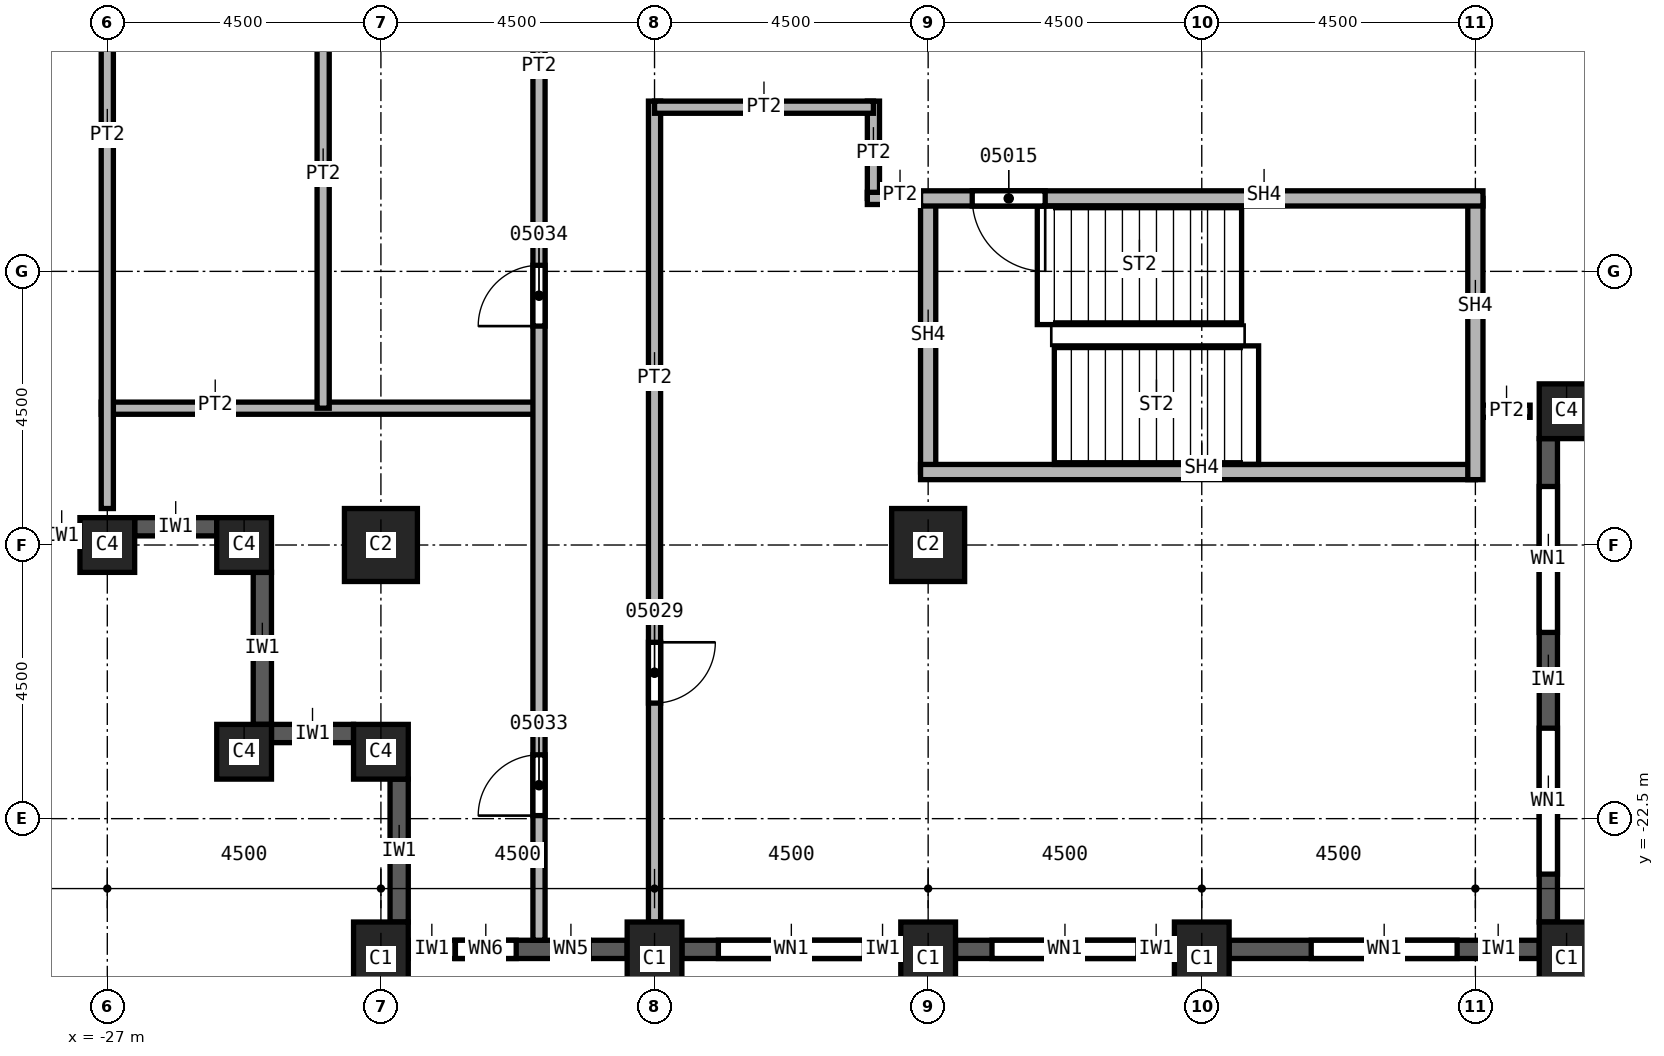
"""IFC4 building model, lengths in metres.
Left out: names, types, materials, properties, quantities, classifications, styles, units other than length and angle.
Written with IfcOpenShell. Run it as: python <this file> out.ifc"""

import sys

from ifc_helpers import new_model, si_unit, direction, frame, frame_2d, origin, origin_2d, place, context, subcontext, project, spatial, rectangle, extrude, element, fill, save


model = new_model("IFC4")
c1 = context("Model", 3, precision=1e-05, world=origin(), true_north=direction((0.0, 1.0)))
c2 = subcontext(c1, "Body", "Model", "MODEL_VIEW")
j1 = project(units=[si_unit("LENGTHUNIT", "METRE"), si_unit("PLANEANGLEUNIT", "RADIAN")], contexts=[c1])
p1 = place(None, origin())
s1 = spatial("IfcSite", under=j1, at=p1, CompositionType="ELEMENT")
p2 = place(p1, origin())
s2 = spatial("IfcBuilding", under=s1, at=p2, CompositionType="ELEMENT")
p3 = place(p2, frame((0.0, 0.0, 112.0)))
s3 = spatial("IfcBuildingStorey", under=s2, at=p3, CompositionType="ELEMENT", Elevation=112.0)
for number, where, z_axis, x_axis in (
    (1, (-13.5, -18.0, 0.0), (0.0, 0.0, 1.0), (1.0, 0.0, 0.0)),
    (2, (-22.5, -18.0, 0.0), (0.0, 0.0, 1.0), (1.0, 0.0, 0.0)),
):
    element("IfcColumn", number, at=place(p3, frame(where, z_axis=z_axis, x_axis=x_axis)), inside=s3, PredefinedType="COLUMN", context=c2, shape_type="SweptSolid", body=[
        extrude(rectangle(XDim=1.2, YDim=1.2, at=origin_2d()), origin(), (0.0, 0.0, 1.0), 3.7),
    ])
for number, where, z_axis, x_axis in (
    (3, (-3.0, -24.8, 0.0), (0.0, 0.0, 1.0), (1.0, 0.0, 0.0)),
    (4, (-9.0, -24.8, 0.0), (0.0, 0.0, 1.0), (1.0, 0.0, 0.0)),
    (5, (-13.5, -24.8, 0.0), (0.0, 0.0, 1.0), (1.0, 0.0, 0.0)),
    (6, (-18.0, -24.8, 0.0), (0.0, 0.0, 1.0), (1.0, 0.0, 0.0)),
    (7, (-22.5, -24.8, 0.0), (0.0, 0.0, 1.0), (1.0, 0.0, 0.0)),
):
    element("IfcColumn", number, at=place(p3, frame(where, z_axis=z_axis, x_axis=x_axis)), inside=s3, PredefinedType="COLUMN", context=c2, shape_type="SweptSolid", body=[
        extrude(rectangle(XDim=0.9, YDim=1.2, at=origin_2d()), origin(), (0.0, 0.0, 1.0), 3.7),
    ])
for number, where, z_axis, x_axis in (
    (8, (-27.0, -18.0, 0.0), (0.0, 0.0, 1.0), (1.0, 0.0, 0.0)),
    (9, (-3.0, -15.8, 0.0), (0.0, 0.0, 1.0), (1.0, 0.0, 0.0)),
    (10, (-22.5, -21.4, 0.0), (0.0, 0.0, 1.0), (1.0, 0.0, 0.0)),
    (11, (-24.75, -21.4, 0.0), (0.0, 0.0, 1.0), (1.0, 0.0, 0.0)),
    (12, (-24.75, -18.0, 0.0), (0.0, 0.0, 1.0), (1.0, 0.0, 0.0)),
):
    element("IfcColumn", number, at=place(p3, frame(where, z_axis=z_axis, x_axis=x_axis)), inside=s3, PredefinedType="COLUMN", context=c2, shape_type="SweptSolid", body=[
        extrude(rectangle(XDim=0.9, YDim=0.9, at=origin_2d()), origin(), (0.0, 0.0, 1.0), 3.7),
    ])
p4 = place(p3, frame((-31.05, -17.85, 0.0), z_axis=(0.0, 0.0, 1.0), x_axis=(1.0, 0.0, 0.0)))
e13 = element("IfcWall", 13, at=p4, inside=s3, PredefinedType="SOLIDWALL", context=c2, shape_type="SweptSolid", body=[
    extrude(rectangle(XDim=3.6, YDim=0.3, at=frame_2d((1.8, 0.0))), origin(), (0.0, 0.0, 1.0), 3.1),
])
p5 = place(p4, frame((0.6, 0.0, 0.8)))
e14 = element("IfcOpeningElement", 14, at=p5, cuts=e13, PredefinedType="OPENING", context=c2, shape_type="SweptSolid", body=[
    extrude(rectangle(XDim=2.4, YDim=1.95, at=frame_2d((1.2, 0.975))), frame((0.0, 0.15, 0.0), z_axis=(0.0, -1.0, 0.0), x_axis=(1.0, 0.0, 0.0)), (0.0, 0.0, 1.0), 0.3),
])
p6 = place(p3, frame((-26.55, -17.7, 0.0), z_axis=(0.0, 0.0, 1.0), x_axis=(1.0, 0.0, 0.0)))
e15 = element("IfcWall", 15, at=p6, inside=s3, PredefinedType="SOLIDWALL", context=c2, shape_type="SweptSolid", body=[
    extrude(rectangle(XDim=1.35, YDim=0.3, at=frame_2d((0.675, 0.0))), origin(), (0.0, 0.0, 1.0), 3.1),
])
p7 = place(p3, frame((-24.45, -18.45, 0.0), z_axis=(0.0, 0.0, 1.0), x_axis=(0.0, -1.0, 0.0)))
e16 = element("IfcWall", 16, at=p7, inside=s3, PredefinedType="SOLIDWALL", context=c2, shape_type="SweptSolid", body=[
    extrude(rectangle(XDim=2.5, YDim=0.3, at=frame_2d((1.25, 0.0))), origin(), (0.0, 0.0, 1.0), 3.1),
])
p8 = place(p3, frame((-24.3, -21.1, 0.0), z_axis=(0.0, 0.0, 1.0), x_axis=(1.0, 0.0, 0.0)))
e17 = element("IfcWall", 17, at=p8, inside=s3, PredefinedType="SOLIDWALL", context=c2, shape_type="SweptSolid", body=[
    extrude(rectangle(XDim=1.35, YDim=0.3, at=frame_2d((0.675, 0.0))), origin(), (0.0, 0.0, 1.0), 3.1),
])
p9 = place(p3, frame((-22.2, -21.85, 0.0), z_axis=(0.0, 0.0, 1.0), x_axis=(0.0, -1.0, 0.0)))
e18 = element("IfcWall", 18, at=p9, inside=s3, PredefinedType="SOLIDWALL", context=c2, shape_type="SweptSolid", body=[
    extrude(rectangle(XDim=2.35, YDim=0.3, at=frame_2d((1.175, 0.0))), origin(), (0.0, 0.0, 1.0), 3.1),
])
p10 = place(p3, frame((-22.05, -24.65, 0.0), z_axis=(0.0, 0.0, 1.0), x_axis=(1.0, 0.0, 0.0)))
e19 = element("IfcWall", 19, at=p10, inside=s3, PredefinedType="SOLIDWALL", context=c2, shape_type="SweptSolid", body=[
    extrude(rectangle(XDim=3.6, YDim=0.3, at=frame_2d((1.8, 0.0))), origin(), (0.0, 0.0, 1.0), 3.1),
])
p11 = place(p10, frame((0.775, 0.0, 0.8)))
e20 = element("IfcOpeningElement", 20, at=p11, cuts=e19, PredefinedType="OPENING", context=c2, shape_type="SweptSolid", body=[
    extrude(rectangle(XDim=1.0, YDim=1.95, at=frame_2d((0.5, 0.975))), frame((0.0, 0.15, 0.0), z_axis=(0.0, -1.0, 0.0), x_axis=(1.0, 0.0, 0.0)), (0.0, 0.0, 1.0), 0.3),
])
p12 = place(p10, frame((2.375, 0.0, 0.8)))
e21 = element("IfcOpeningElement", 21, at=p12, cuts=e19, PredefinedType="OPENING", context=c2, shape_type="SweptSolid", body=[
    extrude(rectangle(XDim=0.6, YDim=1.95, at=frame_2d((0.3, 0.975))), frame((0.0, 0.15, 0.0), z_axis=(0.0, -1.0, 0.0), x_axis=(1.0, 0.0, 0.0)), (0.0, 0.0, 1.0), 0.3),
])
p13 = place(p3, frame((-17.55, -24.65, 0.0), z_axis=(0.0, 0.0, 1.0), x_axis=(1.0, 0.0, 0.0)))
e22 = element("IfcWall", 22, at=p13, inside=s3, PredefinedType="SOLIDWALL", context=c2, shape_type="SweptSolid", body=[
    extrude(rectangle(XDim=3.6, YDim=0.3, at=frame_2d((1.8, 0.0))), origin(), (0.0, 0.0, 1.0), 3.1),
])
p14 = place(p13, frame((0.6, 0.0, 0.8)))
e23 = element("IfcOpeningElement", 23, at=p14, cuts=e22, PredefinedType="OPENING", context=c2, shape_type="SweptSolid", body=[
    extrude(rectangle(XDim=2.4, YDim=1.95, at=frame_2d((1.2, 0.975))), frame((0.0, 0.15, 0.0), z_axis=(0.0, -1.0, 0.0), x_axis=(1.0, 0.0, 0.0)), (0.0, 0.0, 1.0), 0.3),
])
p15 = place(p3, frame((-13.05, -24.65, 0.0), z_axis=(0.0, 0.0, 1.0), x_axis=(1.0, 0.0, 0.0)))
e24 = element("IfcWall", 24, at=p15, inside=s3, PredefinedType="SOLIDWALL", context=c2, shape_type="SweptSolid", body=[
    extrude(rectangle(XDim=3.6, YDim=0.3, at=frame_2d((1.8, 0.0))), origin(), (0.0, 0.0, 1.0), 3.1),
])
p16 = place(p15, frame((0.6, 0.0, 0.8)))
e25 = element("IfcOpeningElement", 25, at=p16, cuts=e24, PredefinedType="OPENING", context=c2, shape_type="SweptSolid", body=[
    extrude(rectangle(XDim=2.4, YDim=1.95, at=frame_2d((1.2, 0.975))), frame((0.0, 0.15, 0.0), z_axis=(0.0, -1.0, 0.0), x_axis=(1.0, 0.0, 0.0)), (0.0, 0.0, 1.0), 0.3),
])
p17 = place(p3, frame((-8.55, -24.65, 0.0), z_axis=(0.0, 0.0, 1.0), x_axis=(1.0, 0.0, 0.0)))
e26 = element("IfcWall", 26, at=p17, inside=s3, PredefinedType="SOLIDWALL", context=c2, shape_type="SweptSolid", body=[
    extrude(rectangle(XDim=5.1, YDim=0.3, at=frame_2d((2.55, 0.0))), origin(), (0.0, 0.0, 1.0), 3.1),
])
p18 = place(p17, frame((1.35, 0.0, 0.8)))
e27 = element("IfcOpeningElement", 27, at=p18, cuts=e26, PredefinedType="OPENING", context=c2, shape_type="SweptSolid", body=[
    extrude(rectangle(XDim=2.4, YDim=1.95, at=frame_2d((1.2, 0.975))), frame((0.0, 0.15, 0.0), z_axis=(0.0, -1.0, 0.0), x_axis=(1.0, 0.0, 0.0)), (0.0, 0.0, 1.0), 0.3),
])
p19 = place(p3, frame((-3.3, -24.2, 0.0), z_axis=(0.0, 0.0, 1.0), x_axis=(0.0, 1.0, 0.0)))
e28 = element("IfcWall", 28, at=p19, inside=s3, PredefinedType="SOLIDWALL", context=c2, shape_type="SweptSolid", body=[
    extrude(rectangle(XDim=7.95, YDim=0.3, at=frame_2d((3.975, 0.0))), origin(), (0.0, 0.0, 1.0), 3.1),
])
p20 = place(p19, frame((0.788, 0.0, 0.8)))
e29 = element("IfcOpeningElement", 29, at=p20, cuts=e28, PredefinedType="OPENING", context=c2, shape_type="SweptSolid", body=[
    extrude(rectangle(XDim=2.4, YDim=1.95, at=frame_2d((1.2, 0.975))), frame((0.0, 0.15, 0.0), z_axis=(0.0, -1.0, 0.0), x_axis=(1.0, 0.0, 0.0)), (0.0, 0.0, 1.0), 0.3),
])
p21 = place(p19, frame((4.762, 0.0, 0.8)))
e30 = element("IfcOpeningElement", 30, at=p21, cuts=e28, PredefinedType="OPENING", context=c2, shape_type="SweptSolid", body=[
    extrude(rectangle(XDim=2.4, YDim=1.95, at=frame_2d((1.2, 0.975))), frame((0.0, 0.15, 0.0), z_axis=(0.0, -1.0, 0.0), x_axis=(1.0, 0.0, 0.0)), (0.0, 0.0, 1.0), 0.3),
])
p22 = place(p3, frame((-27.1, -15.75, 0.0), z_axis=(0.0, 0.0, 1.0), x_axis=(1.0, 0.0, 0.0)))
e31 = element("IfcWall", 31, at=p22, inside=s3, PredefinedType="PARTITIONING", context=c2, shape_type="SweptSolid", body=[
    extrude(rectangle(XDim=7.2, YDim=0.2, at=frame_2d((3.6, 0.0))), origin(), (0.0, 0.0, 1.0), 3.7),
])
p23 = place(p3, frame((-27.0, -17.4, 0.0), z_axis=(0.0, 0.0, 1.0), x_axis=(0.0, 1.0, 0.0)))
e32 = element("IfcWall", 32, at=p23, inside=s3, PredefinedType="PARTITIONING", context=c2, shape_type="SweptSolid", body=[
    extrude(rectangle(XDim=18.15, YDim=0.2, at=frame_2d((9.075, 0.0))), origin(), (0.0, 0.0, 1.0), 3.7),
])
p24 = place(p3, frame((-23.45, -15.75, 0.0), z_axis=(0.0, 0.0, 1.0), x_axis=(0.0, 1.0, 0.0)))
e33 = element("IfcWall", 33, at=p24, inside=s3, PredefinedType="PARTITIONING", context=c2, shape_type="SweptSolid", body=[
    extrude(rectangle(XDim=16.5, YDim=0.2, at=frame_2d((8.25, 0.0))), origin(), (0.0, 0.0, 1.0), 3.7),
])
p25 = place(p24, frame((7.6, 0.0, 0.0)))
e34 = element("IfcOpeningElement", 34, at=p25, cuts=e33, PredefinedType="OPENING", context=c2, shape_type="SweptSolid", body=[
    extrude(rectangle(XDim=1.0, YDim=2.1, at=frame_2d((0.5, 1.05))), frame((0.0, 0.1, 0.0), z_axis=(0.0, -1.0, 0.0), x_axis=(1.0, 0.0, 0.0)), (0.0, 0.0, 1.0), 0.2),
])
p26 = place(p24, frame((13.15, 0.0, 0.0)))
e35 = element("IfcOpeningElement", 35, at=p26, cuts=e33, PredefinedType="OPENING", context=c2, shape_type="SweptSolid", body=[
    extrude(rectangle(XDim=1.0, YDim=2.1, at=frame_2d((0.5, 1.05))), frame((0.0, 0.1, 0.0), z_axis=(0.0, -1.0, 0.0), x_axis=(1.0, 0.0, 0.0)), (0.0, 0.0, 1.0), 0.2),
])
p27 = place(p3, frame((-19.9, -24.5, 0.0), z_axis=(0.0, 0.0, 1.0), x_axis=(0.0, 1.0, 0.0)))
e36 = element("IfcWall", 36, at=p27, inside=s3, PredefinedType="PARTITIONING", context=c2, shape_type="SweptSolid", body=[
    extrude(rectangle(XDim=25.35, YDim=0.2, at=frame_2d((12.675, 0.0))), origin(), (0.0, 0.0, 1.0), 3.7),
])
p28 = place(p27, frame((2.05, 0.0, 0.0)))
e37 = element("IfcOpeningElement", 37, at=p28, cuts=e36, PredefinedType="OPENING", context=c2, shape_type="SweptSolid", body=[
    extrude(rectangle(XDim=1.0, YDim=2.1, at=frame_2d((0.5, 1.05))), frame((0.0, 0.1, 0.0), z_axis=(0.0, -1.0, 0.0), x_axis=(1.0, 0.0, 0.0)), (0.0, 0.0, 1.0), 0.2),
])
p29 = place(p27, frame((10.1, 0.0, 0.0)))
e38 = element("IfcOpeningElement", 38, at=p29, cuts=e36, PredefinedType="OPENING", context=c2, shape_type="SweptSolid", body=[
    extrude(rectangle(XDim=1.0, YDim=2.1, at=frame_2d((0.5, 1.05))), frame((0.0, 0.1, 0.0), z_axis=(0.0, -1.0, 0.0), x_axis=(1.0, 0.0, 0.0)), (0.0, 0.0, 1.0), 0.2),
])
p30 = place(p27, frame((22.85, 0.0, 0.0)))
e39 = element("IfcOpeningElement", 39, at=p30, cuts=e36, PredefinedType="OPENING", context=c2, shape_type="SweptSolid", body=[
    extrude(rectangle(XDim=1.0, YDim=2.1, at=frame_2d((0.5, 1.05))), frame((0.0, 0.1, 0.0), z_axis=(0.0, -1.0, 0.0), x_axis=(1.0, 0.0, 0.0)), (0.0, 0.0, 1.0), 0.2),
])
p31 = place(p3, frame((-18.0, -10.7, 0.0), z_axis=(0.0, 0.0, 1.0), x_axis=(0.0, -1.0, 0.0)))
e40 = element("IfcWall", 40, at=p31, inside=s3, PredefinedType="PARTITIONING", context=c2, shape_type="SweptSolid", body=[
    extrude(rectangle(XDim=13.5, YDim=0.2, at=frame_2d((6.75, 0.0))), origin(), (0.0, 0.0, 1.0), 3.7),
])
p32 = place(p31, frame((8.9, 0.0, 0.0)))
e41 = element("IfcOpeningElement", 41, at=p32, cuts=e40, PredefinedType="OPENING", context=c2, shape_type="SweptSolid", body=[
    extrude(rectangle(XDim=1.0, YDim=2.1, at=frame_2d((0.5, 1.05))), frame((0.0, 0.1, 0.0), z_axis=(0.0, -1.0, 0.0), x_axis=(1.0, 0.0, 0.0)), (0.0, 0.0, 1.0), 0.2),
])
p33 = place(p3, frame((-14.4, -12.3, 0.0), z_axis=(0.0, 0.0, 1.0), x_axis=(0.0, 1.0, 0.0)))
e42 = element("IfcWall", 42, at=p33, inside=s3, PredefinedType="PARTITIONING", context=c2, shape_type="SweptSolid", body=[
    extrude(rectangle(XDim=1.6, YDim=0.2, at=frame_2d((0.8, 0.0))), origin(), (0.0, 0.0, 1.0), 3.7),
])
p34 = place(p3, frame((-14.4, -10.8, 0.0), z_axis=(0.0, 0.0, 1.0), x_axis=(-1.0, 0.0, 0.0)))
e43 = element("IfcWall", 43, at=p34, inside=s3, PredefinedType="PARTITIONING", context=c2, shape_type="SweptSolid", body=[
    extrude(rectangle(XDim=3.6, YDim=0.2, at=frame_2d((1.8, 0.0))), origin(), (0.0, 0.0, 1.0), 3.7),
])
p35 = place(p3, frame((-13.375, -12.3, 0.0), z_axis=(0.0, 0.0, 1.0), x_axis=(-1.0, 0.0, 0.0)))
e44 = element("IfcWall", 44, at=p35, inside=s3, PredefinedType="PARTITIONING", context=c2, shape_type="SweptSolid", body=[
    extrude(rectangle(XDim=1.125, YDim=0.2, at=frame_2d((0.562, 0.0))), origin(), (0.0, 0.0, 1.0), 3.7),
])
p36 = place(p3, frame((-3.6, -15.8, 0.0), z_axis=(0.0, 0.0, 1.0), x_axis=(-1.0, 0.0, 0.0)))
e45 = element("IfcWall", 45, at=p36, inside=s3, PredefinedType="PARTITIONING", context=c2, shape_type="SweptSolid", body=[
    extrude(rectangle(XDim=0.9, YDim=0.2, at=frame_2d((0.45, 0.0))), origin(), (0.0, 0.0, 1.0), 3.7),
])
p37 = place(p3, frame((-13.5, -16.8, 0.0), z_axis=(0.0, 0.0, 1.0), x_axis=(0.0, 1.0, 0.0)))
e46 = element("IfcWall", 46, at=p37, inside=s3, PredefinedType="SOLIDWALL", context=c2, shape_type="SweptSolid", body=[
    extrude(rectangle(XDim=4.5, YDim=0.25, at=frame_2d((2.25, 0.0))), origin(), (0.0, 0.0, 1.0), 3.7),
])
p38 = place(p3, frame((-4.5, -16.8, 0.0), z_axis=(0.0, 0.0, 1.0), x_axis=(-1.0, 0.0, 0.0)))
e47 = element("IfcWall", 47, at=p38, inside=s3, PredefinedType="SOLIDWALL", context=c2, shape_type="SweptSolid", body=[
    extrude(rectangle(XDim=9.125, YDim=0.25, at=frame_2d((4.562, 0.0))), origin(), (0.0, 0.0, 1.0), 3.7),
])
p39 = place(p3, frame((-4.5, -12.3, 0.0), z_axis=(0.0, 0.0, 1.0), x_axis=(0.0, -1.0, 0.0)))
e48 = element("IfcWall", 48, at=p39, inside=s3, PredefinedType="SOLIDWALL", context=c2, shape_type="SweptSolid", body=[
    extrude(rectangle(XDim=4.625, YDim=0.25, at=frame_2d((2.312, 0.0))), origin(), (0.0, 0.0, 1.0), 3.7),
])
p40 = place(p3, frame((-4.375, -12.3, 0.0), z_axis=(0.0, 0.0, 1.0), x_axis=(-1.0, 0.0, 0.0)))
e49 = element("IfcWall", 49, at=p40, inside=s3, PredefinedType="SOLIDWALL", context=c2, shape_type="SweptSolid", body=[
    extrude(rectangle(XDim=9.25, YDim=0.25, at=frame_2d((4.625, 0.0))), origin(), (0.0, 0.0, 1.0), 3.7),
])
p41 = place(p40, frame((7.2, 0.0, 0.0)))
e50 = element("IfcOpeningElement", 50, at=p41, cuts=e49, PredefinedType="OPENING", context=c2, shape_type="SweptSolid", body=[
    extrude(rectangle(XDim=1.2, YDim=2.1, at=frame_2d((0.6, 1.05))), frame((0.0, 0.125, 0.0), z_axis=(0.0, -1.0, 0.0), x_axis=(1.0, 0.0, 0.0)), (0.0, 0.0, 1.0), 0.25),
])
p42 = place(p14, origin())
e51 = element("IfcWindow", 51, at=p42, inside=s3, PartitioningType="SINGLE_PANEL", PredefinedType="WINDOW", context=c2, shape_type="SweptSolid", body=[
    extrude(rectangle(XDim=2.4, YDim=1.95, at=frame_2d((1.2, 0.975))), frame((0.0, 0.03, 0.0), z_axis=(0.0, -1.0, 0.0), x_axis=(1.0, 0.0, 0.0)), (0.0, 0.0, 1.0), 0.06),
])
fill(e23, e51)
p43 = place(p16, origin())
e52 = element("IfcWindow", 52, at=p43, inside=s3, PartitioningType="SINGLE_PANEL", PredefinedType="WINDOW", context=c2, shape_type="SweptSolid", body=[
    extrude(rectangle(XDim=2.4, YDim=1.95, at=frame_2d((1.2, 0.975))), frame((0.0, 0.03, 0.0), z_axis=(0.0, -1.0, 0.0), x_axis=(1.0, 0.0, 0.0)), (0.0, 0.0, 1.0), 0.06),
])
fill(e25, e52)
p44 = place(p18, origin())
e53 = element("IfcWindow", 53, at=p44, inside=s3, PartitioningType="SINGLE_PANEL", PredefinedType="WINDOW", context=c2, shape_type="SweptSolid", body=[
    extrude(rectangle(XDim=2.4, YDim=1.95, at=frame_2d((1.2, 0.975))), frame((0.0, 0.03, 0.0), z_axis=(0.0, -1.0, 0.0), x_axis=(1.0, 0.0, 0.0)), (0.0, 0.0, 1.0), 0.06),
])
fill(e27, e53)
p45 = place(p20, origin())
e54 = element("IfcWindow", 54, at=p45, inside=s3, PartitioningType="SINGLE_PANEL", PredefinedType="WINDOW", context=c2, shape_type="SweptSolid", body=[
    extrude(rectangle(XDim=2.4, YDim=1.95, at=frame_2d((1.2, 0.975))), frame((0.0, 0.03, 0.0), z_axis=(0.0, -1.0, 0.0), x_axis=(1.0, 0.0, 0.0)), (0.0, 0.0, 1.0), 0.06),
])
fill(e29, e54)
p46 = place(p21, origin())
e55 = element("IfcWindow", 55, at=p46, inside=s3, PartitioningType="SINGLE_PANEL", PredefinedType="WINDOW", context=c2, shape_type="SweptSolid", body=[
    extrude(rectangle(XDim=2.4, YDim=1.95, at=frame_2d((1.2, 0.975))), frame((0.0, 0.03, 0.0), z_axis=(0.0, -1.0, 0.0), x_axis=(1.0, 0.0, 0.0)), (0.0, 0.0, 1.0), 0.06),
])
fill(e30, e55)
p47 = place(p41, origin())
e56 = element("IfcDoor", 56, at=p47, inside=s3, OperationType="SINGLE_SWING_RIGHT", PredefinedType="DOOR", context=c2, shape_type="SweptSolid", body=[
    extrude(rectangle(XDim=1.2, YDim=2.1, at=frame_2d((0.6, 1.05))), frame((0.0, 0.025, 0.0), z_axis=(0.0, -1.0, 0.0), x_axis=(1.0, 0.0, 0.0)), (0.0, 0.0, 1.0), 0.05),
])
fill(e50, e56)
p48 = place(p32, origin())
e57 = element("IfcDoor", 57, at=p48, inside=s3, OperationType="SINGLE_SWING_RIGHT", PredefinedType="DOOR", context=c2, shape_type="SweptSolid", body=[
    extrude(rectangle(XDim=1.0, YDim=2.1, at=frame_2d((0.5, 1.05))), frame((0.0, 0.025, 0.0), z_axis=(0.0, -1.0, 0.0), x_axis=(1.0, 0.0, 0.0)), (0.0, 0.0, 1.0), 0.05),
])
fill(e41, e57)
p49 = place(p28, origin())
e58 = element("IfcDoor", 58, at=p49, inside=s3, OperationType="SINGLE_SWING_RIGHT", PredefinedType="DOOR", context=c2, shape_type="SweptSolid", body=[
    extrude(rectangle(XDim=1.0, YDim=2.1, at=frame_2d((0.5, 1.05))), frame((0.0, 0.025, 0.0), z_axis=(0.0, -1.0, 0.0), x_axis=(1.0, 0.0, 0.0)), (0.0, 0.0, 1.0), 0.05),
])
fill(e37, e58)
p50 = place(p29, origin())
e59 = element("IfcDoor", 59, at=p50, inside=s3, OperationType="SINGLE_SWING_LEFT", PredefinedType="DOOR", context=c2, shape_type="SweptSolid", body=[
    extrude(rectangle(XDim=1.0, YDim=2.1, at=frame_2d((0.5, 1.05))), frame((0.0, 0.025, 0.0), z_axis=(0.0, -1.0, 0.0), x_axis=(1.0, 0.0, 0.0)), (0.0, 0.0, 1.0), 0.05),
])
fill(e38, e59)
p51 = place(p11, origin())
e60 = element("IfcWindow", 60, at=p51, inside=s3, PartitioningType="SINGLE_PANEL", PredefinedType="WINDOW", context=c2, shape_type="SweptSolid", body=[
    extrude(rectangle(XDim=1.0, YDim=1.95, at=frame_2d((0.5, 0.975))), frame((0.0, 0.03, 0.0), z_axis=(0.0, -1.0, 0.0), x_axis=(1.0, 0.0, 0.0)), (0.0, 0.0, 1.0), 0.06),
])
fill(e20, e60)
p52 = place(p12, origin())
e61 = element("IfcWindow", 61, at=p52, inside=s3, PartitioningType="SINGLE_PANEL", PredefinedType="WINDOW", context=c2, shape_type="SweptSolid", body=[
    extrude(rectangle(XDim=0.6, YDim=1.95, at=frame_2d((0.3, 0.975))), frame((0.0, 0.03, 0.0), z_axis=(0.0, -1.0, 0.0), x_axis=(1.0, 0.0, 0.0)), (0.0, 0.0, 1.0), 0.06),
])
fill(e21, e61)
save(model, sys.argv[1])
